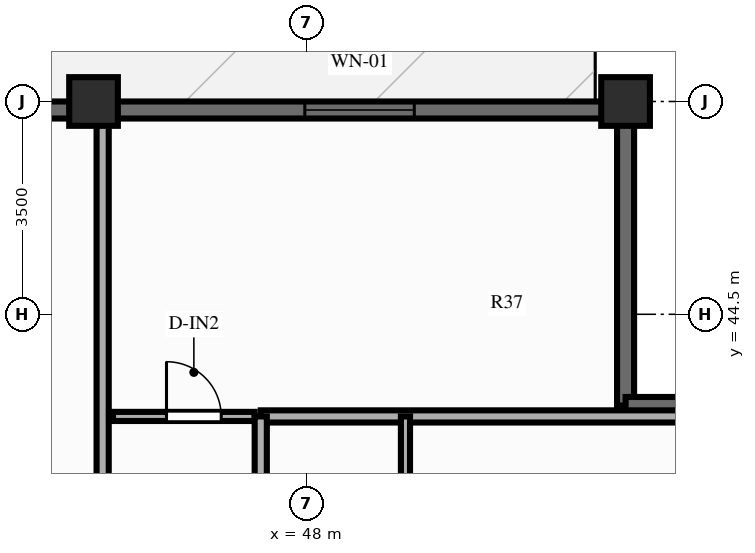
"""IFC4 building model, lengths in metres.
Left out: names, types, materials, properties, quantities, classifications, styles, units other than length and angle.
Written with IfcOpenShell. Run it as: python <this file> out.ifc"""

import sys

from ifc_helpers import new_model, si_unit, direction, frame, frame_2d, origin, origin_2d, place, context, subcontext, project, spatial, rectangle, extrude, source, transform, mapped, element, fill, save


model = new_model("IFC4")
c1 = context("Model", 3, precision=1e-05, world=origin(), true_north=direction((0.0, 1.0)))
c2 = subcontext(c1, "Body", "Model", "MODEL_VIEW")
j1 = project(units=[si_unit("LENGTHUNIT", "METRE"), si_unit("PLANEANGLEUNIT", "RADIAN")], contexts=[c1])
p1 = place(None, origin())
s1 = spatial("IfcSite", under=j1, at=p1, CompositionType="ELEMENT")
p2 = place(p1, origin())
s2 = spatial("IfcBuilding", under=s1, at=p2, CompositionType="ELEMENT")
p3 = place(p2, frame((0.0, 0.0, 172.9)))
s3 = spatial("IfcBuildingStorey", under=s2, at=p3, CompositionType="ELEMENT", Elevation=172.9)
m1 = source(origin(), c2, "Body", "SweptSolid", [
    extrude(rectangle(XDim=0.8, YDim=0.8, at=origin_2d()), origin(), (0.0, 0.0, 1.0), 3.9),
])
for number, where, z_axis, x_axis in (
    (1, (53.25, 48.0, 0.0), (0.0, 0.0, 1.0), (1.0, 0.0, 0.0)),
    (2, (44.5, 48.0, 0.0), (0.0, 0.0, 1.0), (1.0, 0.0, 0.0)),
):
    element("IfcColumn", number, at=place(p3, frame(where, z_axis=z_axis, x_axis=x_axis)), inside=s3, PredefinedType="COLUMN", context=c2, shape_type="MappedRepresentation", body=[
        mapped(m1, transform((0.0, 0.0, 0.0), scale=1.0)),
    ])
p4 = place(p3, frame((22.75, 47.86, 0.0), z_axis=(0.0, 0.0, 1.0), x_axis=(1.0, 0.0, 0.0)))
e3 = element("IfcWall", 3, at=p4, inside=s3, PredefinedType="SOLIDWALL", context=c2, shape_type="SweptSolid", body=[
    extrude(rectangle(XDim=30.5, YDim=0.28, at=frame_2d((15.25, 0.0))), origin(), (0.0, 0.0, 1.0), 2.79),
])
p5 = place(p4, frame((3.825, 0.0, 0.0)))
e4 = element("IfcOpeningElement", 4, at=p5, cuts=e3, PredefinedType="OPENING", context=c2, shape_type="SweptSolid", body=[
    extrude(rectangle(XDim=1.1, YDim=2.15, at=frame_2d((0.55, 1.075))), frame((0.0, 0.152, 0.0), z_axis=(0.0, -1.0, 0.0), x_axis=(1.0, 0.0, 0.0)), (0.0, 0.0, 1.0), 0.304),
])
p6 = place(p4, frame((9.395, 0.0, 0.85)))
e5 = element("IfcOpeningElement", 5, at=p6, cuts=e3, PredefinedType="OPENING", context=c2, shape_type="SweptSolid", body=[
    extrude(rectangle(XDim=0.95, YDim=1.5, at=frame_2d((0.475, 0.75))), frame((0.0, 0.152, 0.0), z_axis=(0.0, -1.0, 0.0), x_axis=(1.0, 0.0, 0.0)), (0.0, 0.0, 1.0), 0.304),
])
p7 = place(p4, frame((11.282, 0.0, 0.85)))
e6 = element("IfcOpeningElement", 6, at=p7, cuts=e3, PredefinedType="OPENING", context=c2, shape_type="SweptSolid", body=[
    extrude(rectangle(XDim=1.5, YDim=1.65, at=frame_2d((0.75, 0.825))), frame((0.0, 0.152, 0.0), z_axis=(0.0, -1.0, 0.0), x_axis=(1.0, 0.0, 0.0)), (0.0, 0.0, 1.0), 0.304),
])
p8 = place(p4, frame((13.92, 0.0, 0.85)))
e7 = element("IfcOpeningElement", 7, at=p8, cuts=e3, PredefinedType="OPENING", context=c2, shape_type="SweptSolid", body=[
    extrude(rectangle(XDim=1.8, YDim=1.65, at=frame_2d((0.9, 0.825))), frame((0.0, 0.152, 0.0), z_axis=(0.0, -1.0, 0.0), x_axis=(1.0, 0.0, 0.0)), (0.0, 0.0, 1.0), 0.304),
])
p9 = place(p4, frame((16.93, 0.0, 0.85)))
e8 = element("IfcOpeningElement", 8, at=p9, cuts=e3, PredefinedType="OPENING", context=c2, shape_type="SweptSolid", body=[
    extrude(rectangle(XDim=1.8, YDim=1.65, at=frame_2d((0.9, 0.825))), frame((0.0, 0.152, 0.0), z_axis=(0.0, -1.0, 0.0), x_axis=(1.0, 0.0, 0.0)), (0.0, 0.0, 1.0), 0.304),
])
p10 = place(p4, frame((19.823, 0.0, 0.85)))
e9 = element("IfcOpeningElement", 9, at=p10, cuts=e3, PredefinedType="OPENING", context=c2, shape_type="SweptSolid", body=[
    extrude(rectangle(XDim=1.2, YDim=1.5, at=frame_2d((0.6, 0.75))), frame((0.0, 0.152, 0.0), z_axis=(0.0, -1.0, 0.0), x_axis=(1.0, 0.0, 0.0)), (0.0, 0.0, 1.0), 0.304),
])
p11 = place(p4, frame((25.225, 0.0, 0.85)))
e10 = element("IfcOpeningElement", 10, at=p11, cuts=e3, PredefinedType="OPENING", context=c2, shape_type="SweptSolid", body=[
    extrude(rectangle(XDim=1.8, YDim=1.65, at=frame_2d((0.9, 0.825))), frame((0.0, 0.152, 0.0), z_axis=(0.0, -1.0, 0.0), x_axis=(1.0, 0.0, 0.0)), (0.0, 0.0, 1.0), 0.304),
])
for number, where, z_axis, x_axis in (
    (11, (53.25, 43.0, 0.0), (0.0, 0.0, 1.0), (0.0, 1.0, 0.0)),
    (12, (53.25, 43.0, 0.0), (0.0, 0.0, 1.0), (1.0, 0.0, 0.0)),
):
    element("IfcWall", number, at=place(p3, frame(where, z_axis=z_axis, x_axis=x_axis)), inside=s3, PredefinedType="SOLIDWALL", context=c2, shape_type="SweptSolid", body=[
        extrude(rectangle(XDim=4.92, YDim=0.28, at=frame_2d((2.46, 0.0))), origin(), (0.0, 0.0, 1.0), 2.79),
    ])
p12 = place(p3, frame((44.82, 42.82, 0.0), z_axis=(0.0, 0.0, 1.0), x_axis=(1.0, 0.0, 0.0)))
e13 = element("IfcWall", 13, at=p12, inside=s3, PredefinedType="PARTITIONING", context=c2, shape_type="SweptSolid", body=[
    extrude(rectangle(XDim=2.33, YDim=0.15, at=frame_2d((1.165, 0.0))), origin(), (0.0, 0.0, 1.0), 3.69),
])
p13 = place(p12, frame((0.88, 0.0, 0.0)))
e14 = element("IfcOpeningElement", 14, at=p13, cuts=e13, PredefinedType="OPENING", context=c2, shape_type="SweptSolid", body=[
    extrude(rectangle(XDim=0.9, YDim=2.1, at=frame_2d((0.45, 1.05))), frame((0.0, 0.087, 0.0), z_axis=(0.0, -1.0, 0.0), x_axis=(1.0, 0.0, 0.0)), (0.0, 0.0, 1.0), 0.174),
])
p14 = place(p3, frame((44.65, 39.05, 0.0), z_axis=(0.0, 0.0, 1.0), x_axis=(0.0, 1.0, 0.0)))
e15 = element("IfcWall", 15, at=p14, inside=s3, PredefinedType="PARTITIONING", context=c2, shape_type="SweptSolid", body=[
    extrude(rectangle(XDim=8.8, YDim=0.2, at=frame_2d((4.4, 0.0))), origin(), (0.0, 0.0, 1.0), 2.79),
])
p15 = place(p3, frame((47.25, 42.82, 0.0), z_axis=(0.0, 0.0, 1.0), x_axis=(1.0, 0.0, 0.0)))
e16 = element("IfcWall", 16, at=p15, inside=s3, PredefinedType="PARTITIONING", context=c2, shape_type="SweptSolid", body=[
    extrude(rectangle(XDim=10.85, YDim=0.2, at=frame_2d((5.425, 0.0))), origin(), (0.0, 0.0, 1.0), 3.69),
])
p16 = place(p3, frame((47.25, 38.983, 0.0), z_axis=(0.0, 0.0, 1.0), x_axis=(0.0, 1.0, 0.0)))
e17 = element("IfcWall", 17, at=p16, inside=s3, PredefinedType="PARTITIONING", context=c2, shape_type="SweptSolid", body=[
    extrude(rectangle(XDim=3.837, YDim=0.2, at=frame_2d((1.918, 0.0))), origin(), (0.0, 0.0, 1.0), 3.69),
])
p17 = place(p3, frame((49.63, 38.983, 0.0), z_axis=(0.0, 0.0, 1.0), x_axis=(0.0, 1.0, 0.0)))
e18 = element("IfcWall", 18, at=p17, inside=s3, PredefinedType="PARTITIONING", context=c2, shape_type="SweptSolid", body=[
    extrude(rectangle(XDim=3.837, YDim=0.15, at=frame_2d((1.918, 0.0))), origin(), (0.0, 0.0, 1.0), 3.69),
])
m2 = source(origin(), c2, "Body", "SweptSolid", [
    extrude(rectangle(XDim=1.8, YDim=1.65, at=frame_2d((0.9, 0.825))), frame((0.0, 0.03, 0.0), z_axis=(0.0, -1.0, 0.0), x_axis=(1.0, 0.0, 0.0)), (0.0, 0.0, 1.0), 0.06),
])
p18 = place(p11, origin())
e19 = element("IfcWindow", 19, at=p18, inside=s3, PartitioningType="SINGLE_PANEL", PredefinedType="WINDOW", context=c2, shape_type="MappedRepresentation", body=[
    mapped(m2, transform((0.0, 0.0, 0.0), scale=1.0)),
])
fill(e10, e19)
m3 = source(origin(), c2, "Body", "SweptSolid", [
    extrude(rectangle(XDim=0.9, YDim=2.1, at=frame_2d((0.45, 1.05))), frame((0.0, 0.025, 0.0), z_axis=(0.0, -1.0, 0.0), x_axis=(1.0, 0.0, 0.0)), (0.0, 0.0, 1.0), 0.05),
])
p19 = place(p13, origin())
e20 = element("IfcDoor", 20, at=p19, inside=s3, OperationType="SINGLE_SWING_LEFT", PredefinedType="DOOR", context=c2, shape_type="MappedRepresentation", body=[
    mapped(m3, transform((0.0, 0.0, 0.0), scale=1.0)),
])
fill(e14, e20)
save(model, sys.argv[1])
